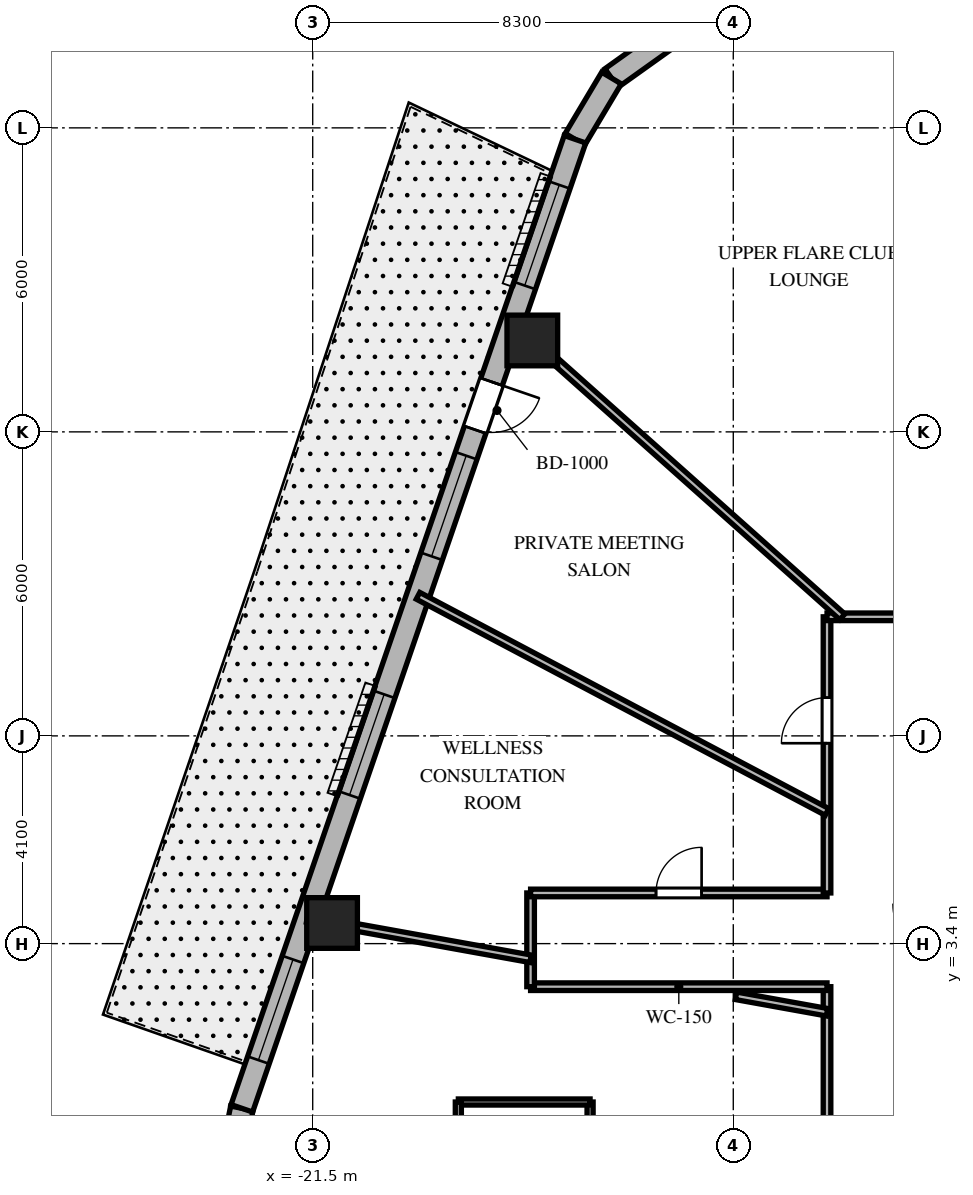
"""IFC4 building model, lengths in metres.
Left out: names, types, materials, properties, quantities, classifications, styles, units other than length and angle.
Written with IfcOpenShell. Run it as: python <this file> out.ifc"""

import sys

from ifc_helpers import new_model, si_unit, direction, frame, frame_2d, origin, origin_2d, place, context, subcontext, project, spatial, rectangle, extrude, element, fill, save


model = new_model("IFC4")
c1 = context("Model", 3, precision=1e-05, world=origin(), true_north=direction((0.0, 1.0)))
c2 = subcontext(c1, "Body", "Model", "MODEL_VIEW")
j1 = project(units=[si_unit("LENGTHUNIT", "METRE"), si_unit("PLANEANGLEUNIT", "RADIAN")], contexts=[c1])
p1 = place(None, origin())
s1 = spatial("IfcSite", under=j1, at=p1, CompositionType="ELEMENT")
p2 = place(p1, origin())
s2 = spatial("IfcBuilding", under=s1, at=p2, CompositionType="ELEMENT")
p3 = place(p2, frame((0.0, 0.0, 206.5)))
s3 = spatial("IfcBuildingStorey", under=s2, at=p3, CompositionType="ELEMENT", Elevation=206.5)
for number, where, z_axis, x_axis in (
    (1, (-17.166, 15.304, 0.0), (0.0, 0.0, 1.0), (1.0, 0.0, 0.0)),
    (2, (-21.118, 3.807, 0.0), (0.0, 0.0, 1.0), (1.0, 0.0, 0.0)),
):
    element("IfcColumn", number, at=place(p3, frame(where, z_axis=z_axis, x_axis=x_axis)), inside=s3, PredefinedType="COLUMN", context=c2, shape_type="SweptSolid", body=[
        extrude(rectangle(XDim=1.0, YDim=1.0, at=origin_2d()), origin(), (0.0, 0.0, 1.0), 3.8),
    ])
p4 = place(p3, frame((-14.478, 21.287, 0.0), z_axis=(0.0, 0.0, 1.0), x_axis=(-0.813888518617, -0.58102106611, 0.0)))
e3 = element("IfcWall", 3, at=p4, inside=s3, PredefinedType="SOLIDWALL", context=c2, shape_type="SweptSolid", body=[
    extrude(rectangle(XDim=1.383, YDim=0.45, at=frame_2d((0.691, 0.0))), origin(), (0.0, 0.0, 1.0), 3.5),
])
p5 = place(p3, frame((-15.604, 20.483, 0.0), z_axis=(0.0, 0.0, 1.0), x_axis=(-0.512222149036, -0.858852996756, 0.0)))
e4 = element("IfcWall", 4, at=p5, inside=s3, PredefinedType="SOLIDWALL", context=c2, shape_type="SweptSolid", body=[
    extrude(rectangle(XDim=1.406, YDim=0.45, at=frame_2d((0.703, 0.0))), origin(), (0.0, 0.0, 1.0), 3.5),
])
p6 = place(p3, frame((-22.898, 0.15, 0.0), z_axis=(0.0, 0.0, 1.0), x_axis=(-0.199055826889, -0.979988151858, 0.0)))
e5 = element("IfcWall", 5, at=p6, inside=s3, PredefinedType="SOLIDWALL", context=c2, shape_type="SweptSolid", body=[
    extrude(rectangle(XDim=0.894, YDim=0.45, at=frame_2d((0.447, 0.0))), origin(), (0.0, 0.0, 1.0), 3.5),
])
p7 = place(p3, frame((-16.324, 19.275, 0.0), z_axis=(0.0, 0.0, 1.0), x_axis=(-0.325083142304, -0.945685439557, 0.0)))
e6 = element("IfcWall", 6, at=p7, inside=s3, PredefinedType="SOLIDWALL", context=c2, shape_type="SweptSolid", body=[
    extrude(rectangle(XDim=20.224, YDim=0.45, at=frame_2d((10.112, 0.0))), origin(), (0.0, 0.0, 1.0), 3.5),
])
p8 = place(p7, frame((5.062, 0.0, 0.0)))
e7 = element("IfcOpeningElement", 7, at=p8, cuts=e6, PredefinedType="OPENING", context=c2, shape_type="SweptSolid", body=[
    extrude(rectangle(XDim=1.0, YDim=2.15, at=frame_2d((0.5, 1.075))), frame((0.0, 0.235, 0.0), z_axis=(0.0, -1.0, 0.0), x_axis=(1.0, 0.0, 0.0)), (0.0, 0.0, 1.0), 0.47),
])
p9 = place(p7, frame((0.953, 0.0, 0.8)))
e8 = element("IfcOpeningElement", 8, at=p9, cuts=e6, PredefinedType="OPENING", context=c2, shape_type="SweptSolid", body=[
    extrude(rectangle(XDim=2.1, YDim=1.85, at=frame_2d((1.05, 0.925))), frame((0.0, 0.235, 0.0), z_axis=(0.0, -1.0, 0.0), x_axis=(1.0, 0.0, 0.0)), (0.0, 0.0, 1.0), 0.47),
])
p10 = place(p7, frame((6.604, 0.0, 0.8)))
e9 = element("IfcOpeningElement", 9, at=p10, cuts=e6, PredefinedType="OPENING", context=c2, shape_type="SweptSolid", body=[
    extrude(rectangle(XDim=2.1, YDim=1.85, at=frame_2d((1.05, 0.925))), frame((0.0, 0.235, 0.0), z_axis=(0.0, -1.0, 0.0), x_axis=(1.0, 0.0, 0.0)), (0.0, 0.0, 1.0), 0.47),
])
p11 = place(p7, frame((11.585, 0.0, 0.8)))
e10 = element("IfcOpeningElement", 10, at=p11, cuts=e6, PredefinedType="OPENING", context=c2, shape_type="SweptSolid", body=[
    extrude(rectangle(XDim=2.1, YDim=1.85, at=frame_2d((1.05, 0.925))), frame((0.0, 0.235, 0.0), z_axis=(0.0, -1.0, 0.0), x_axis=(1.0, 0.0, 0.0)), (0.0, 0.0, 1.0), 0.47),
])
p12 = place(p7, frame((17.118, 0.0, 0.8)))
e11 = element("IfcOpeningElement", 11, at=p12, cuts=e6, PredefinedType="OPENING", context=c2, shape_type="SweptSolid", body=[
    extrude(rectangle(XDim=2.1, YDim=1.85, at=frame_2d((1.05, 0.925))), frame((0.0, 0.235, 0.0), z_axis=(0.0, -1.0, 0.0), x_axis=(1.0, 0.0, 0.0)), (0.0, 0.0, 1.0), 0.47),
])
p13 = place(p3, frame((-11.35, -9.85, 0.0), z_axis=(0.0, 0.0, 1.0), x_axis=(0.0, 1.0, 0.0)))
e12 = element("IfcWall", 12, at=p13, inside=s3, PredefinedType="PARTITIONING", context=c2, shape_type="SweptSolid", body=[
    extrude(rectangle(XDim=12.4, YDim=0.15, at=frame_2d((6.2, 0.0))), origin(), (0.0, 0.0, 1.0), 2.99),
])
p14 = place(p13, frame((8.835, 0.0, 0.0)))
e13 = element("IfcOpeningElement", 13, at=p14, cuts=e12, PredefinedType="OPENING", context=c2, shape_type="SweptSolid", body=[
    extrude(rectangle(XDim=0.95, YDim=2.03, at=frame_2d((0.475, 1.015))), frame((0.0, 0.085, 0.0), z_axis=(0.0, -1.0, 0.0), x_axis=(1.0, 0.0, 0.0)), (0.0, 0.0, 1.0), 0.17),
])
p15 = place(p13, frame((4.191, 0.0, 0.0)))
e14 = element("IfcOpeningElement", 14, at=p15, cuts=e12, PredefinedType="OPENING", context=c2, shape_type="SweptSolid", body=[
    extrude(rectangle(XDim=0.95, YDim=2.03, at=frame_2d((0.475, 1.015))), frame((0.0, 0.085, 0.0), z_axis=(0.0, -1.0, 0.0), x_axis=(1.0, 0.0, 0.0)), (0.0, 0.0, 1.0), 0.17),
])
p16 = place(p13, frame((0.994, 0.0, 0.0)))
e15 = element("IfcOpeningElement", 15, at=p16, cuts=e12, PredefinedType="OPENING", context=c2, shape_type="SweptSolid", body=[
    extrude(rectangle(XDim=0.9, YDim=2.03, at=frame_2d((0.45, 1.015))), frame((0.0, 0.085, 0.0), z_axis=(0.0, -1.0, 0.0), x_axis=(1.0, 0.0, 0.0)), (0.0, 0.0, 1.0), 0.17),
])
p17 = place(p3, frame((-11.35, 2.55, 0.0), z_axis=(0.0, 0.0, 1.0), x_axis=(-1.0, 0.0, 0.0)))
e16 = element("IfcWall", 16, at=p17, inside=s3, PredefinedType="PARTITIONING", context=c2, shape_type="SweptSolid", body=[
    extrude(rectangle(XDim=5.85, YDim=0.15, at=frame_2d((2.925, 0.0))), origin(), (0.0, 0.0, 1.0), 2.94),
])
p18 = place(p3, frame((-17.2, 2.55, 0.0), z_axis=(0.0, 0.0, 1.0), x_axis=(0.0, 1.0, 0.0)))
e17 = element("IfcWall", 17, at=p18, inside=s3, PredefinedType="PARTITIONING", context=c2, shape_type="SweptSolid", body=[
    extrude(rectangle(XDim=1.85, YDim=0.15, at=frame_2d((0.925, 0.0))), origin(), (0.0, 0.0, 1.0), 2.94),
])
p19 = place(p3, frame((-17.2, 4.4, 0.0), z_axis=(0.0, 0.0, 1.0), x_axis=(1.0, 0.0, 0.0)))
e18 = element("IfcWall", 18, at=p19, inside=s3, PredefinedType="PARTITIONING", context=c2, shape_type="SweptSolid", body=[
    extrude(rectangle(XDim=5.85, YDim=0.15, at=frame_2d((2.925, 0.0))), origin(), (0.0, 0.0, 1.0), 2.94),
])
p20 = place(p19, frame((2.475, 0.0, 0.0)))
e19 = element("IfcOpeningElement", 19, at=p20, cuts=e18, PredefinedType="OPENING", context=c2, shape_type="SweptSolid", body=[
    extrude(rectangle(XDim=0.9, YDim=2.03, at=frame_2d((0.45, 1.015))), frame((0.0, 0.085, 0.0), z_axis=(0.0, -1.0, 0.0), x_axis=(1.0, 0.0, 0.0)), (0.0, 0.0, 1.0), 0.17),
])
p21 = place(p3, frame((-11.35, 4.4, 0.0), z_axis=(0.0, 0.0, 1.0), x_axis=(0.0, 1.0, 0.0)))
e20 = element("IfcWall", 20, at=p21, inside=s3, PredefinedType="PARTITIONING", context=c2, shape_type="SweptSolid", body=[
    extrude(rectangle(XDim=5.45, YDim=0.15, at=frame_2d((2.725, 0.0))), origin(), (0.0, 0.0, 1.0), 2.99),
])
p22 = place(p21, frame((2.955, 0.0, 0.0)))
e21 = element("IfcOpeningElement", 21, at=p22, cuts=e20, PredefinedType="OPENING", context=c2, shape_type="SweptSolid", body=[
    extrude(rectangle(XDim=0.9, YDim=2.03, at=frame_2d((0.45, 1.015))), frame((0.0, 0.085, 0.0), z_axis=(0.0, -1.0, 0.0), x_axis=(1.0, 0.0, 0.0)), (0.0, 0.0, 1.0), 0.17),
])
p23 = place(p3, frame((-11.35, 9.85, 0.0), z_axis=(0.0, 0.0, 1.0), x_axis=(1.0, 0.0, 0.0)))
e22 = element("IfcWall", 22, at=p23, inside=s3, PredefinedType="PARTITIONING", context=c2, shape_type="SweptSolid", body=[
    extrude(rectangle(XDim=10.43, YDim=0.15, at=frame_2d((5.215, 0.0))), origin(), (0.0, 0.0, 1.0), 2.99),
])
p24 = place(p23, frame((8.362, 0.0, 0.0)))
e23 = element("IfcOpeningElement", 23, at=p24, cuts=e22, PredefinedType="OPENING", context=c2, shape_type="SweptSolid", body=[
    extrude(rectangle(XDim=0.95, YDim=2.03, at=frame_2d((0.475, 1.015))), frame((0.0, 0.085, 0.0), z_axis=(0.0, -1.0, 0.0), x_axis=(1.0, 0.0, 0.0)), (0.0, 0.0, 1.0), 0.17),
])
p25 = place(p23, frame((3.396, 0.0, 0.0)))
e24 = element("IfcOpeningElement", 24, at=p25, cuts=e22, PredefinedType="OPENING", context=c2, shape_type="SweptSolid", body=[
    extrude(rectangle(XDim=0.95, YDim=2.03, at=frame_2d((0.475, 1.015))), frame((0.0, 0.085, 0.0), z_axis=(0.0, -1.0, 0.0), x_axis=(1.0, 0.0, 0.0)), (0.0, 0.0, 1.0), 0.17),
])
p26 = place(p3, frame((-11.048, 9.85, 0.0), z_axis=(0.0, 0.0, 1.0), x_axis=(-0.746444434655, 0.665447748492, 0.0)))
e25 = element("IfcWall", 25, at=p26, inside=s3, PredefinedType="PARTITIONING", context=c2, shape_type="SweptSolid", body=[
    extrude(rectangle(XDim=8.732, YDim=0.15, at=frame_2d((4.366, 0.0))), origin(), (0.0, 0.0, 1.0), 2.74),
])
p27 = place(p3, frame((-11.35, 5.999, 0.0), z_axis=(0.0, 0.0, 1.0), x_axis=(-0.884112301724, 0.467274478161, 0.0)))
e26 = element("IfcWall", 26, at=p27, inside=s3, PredefinedType="PARTITIONING", context=c2, shape_type="SweptSolid", body=[
    extrude(rectangle(XDim=9.129, YDim=0.15, at=frame_2d((4.564, 0.0))), origin(), (0.0, 0.0, 1.0), 2.74),
])
p28 = place(p3, frame((-11.35, 2.046, 0.0), z_axis=(0.0, 0.0, 1.0), x_axis=(-0.984127783205, 0.177461281195, 0.0)))
e27 = element("IfcWall", 27, at=p28, inside=s3, PredefinedType="PARTITIONING", context=c2, shape_type="SweptSolid", body=[
    extrude(rectangle(XDim=1.826, YDim=0.15, at=frame_2d((0.913, 0.0))), origin(), (0.0, 0.0, 1.0), 3.5),
])
p29 = place(p3, frame((-17.2, 3.101, 0.0), z_axis=(0.0, 0.0, 1.0), x_axis=(-0.98413465883, 0.177423147559, 0.0)))
e28 = element("IfcWall", 28, at=p29, inside=s3, PredefinedType="PARTITIONING", context=c2, shape_type="SweptSolid", body=[
    extrude(rectangle(XDim=4.482, YDim=0.15, at=frame_2d((2.241, 0.0))), origin(), (0.0, 0.0, 1.0), 2.74),
])
p30 = place(p3, frame((-16.026, -2.476, 0.0), z_axis=(0.0, 0.0, 1.0), x_axis=(0.0, 1.0, 0.0)))
e29 = element("IfcWall", 29, at=p30, inside=s3, PredefinedType="PARTITIONING", context=c2, shape_type="SweptSolid", body=[
    extrude(rectangle(XDim=2.75, YDim=0.12, at=frame_2d((1.375, 0.0))), origin(), (0.0, 0.0, 1.0), 3.5),
])
p31 = place(p3, frame((-16.026, 0.274, 0.0), z_axis=(0.0, 0.0, 1.0), x_axis=(-1.0, 0.0, 0.0)))
e30 = element("IfcWall", 30, at=p31, inside=s3, PredefinedType="PARTITIONING", context=c2, shape_type="SweptSolid", body=[
    extrude(rectangle(XDim=2.6, YDim=0.12, at=frame_2d((1.3, 0.0))), origin(), (0.0, 0.0, 1.0), 2.94),
])
p32 = place(p3, frame((-18.626, 0.274, 0.0), z_axis=(0.0, 0.0, 1.0), x_axis=(0.0, -1.0, 0.0)))
e31 = element("IfcWall", 31, at=p32, inside=s3, PredefinedType="PARTITIONING", context=c2, shape_type="SweptSolid", body=[
    extrude(rectangle(XDim=2.75, YDim=0.12, at=frame_2d((1.375, 0.0))), origin(), (0.0, 0.0, 1.0), 3.5),
])
p33 = place(p8, origin())
e32 = element("IfcDoor", 32, at=p33, inside=s3, OperationType="SINGLE_SWING_LEFT", PredefinedType="DOOR", context=c2, shape_type="SweptSolid", body=[
    extrude(rectangle(XDim=1.0, YDim=2.15, at=frame_2d((0.5, 1.075))), frame((0.0, 0.025, 0.0), z_axis=(0.0, -1.0, 0.0), x_axis=(1.0, 0.0, 0.0)), (0.0, 0.0, 1.0), 0.05),
])
fill(e7, e32)
p34 = place(p9, origin())
e33 = element("IfcWindow", 33, at=p34, inside=s3, PartitioningType="SINGLE_PANEL", PredefinedType="WINDOW", context=c2, shape_type="SweptSolid", body=[
    extrude(rectangle(XDim=2.1, YDim=1.85, at=frame_2d((1.05, 0.925))), frame((0.0, 0.03, 0.0), z_axis=(0.0, -1.0, 0.0), x_axis=(1.0, 0.0, 0.0)), (0.0, 0.0, 1.0), 0.06),
])
fill(e8, e33)
p35 = place(p10, origin())
e34 = element("IfcWindow", 34, at=p35, inside=s3, PartitioningType="SINGLE_PANEL", PredefinedType="WINDOW", context=c2, shape_type="SweptSolid", body=[
    extrude(rectangle(XDim=2.1, YDim=1.85, at=frame_2d((1.05, 0.925))), frame((0.0, 0.03, 0.0), z_axis=(0.0, -1.0, 0.0), x_axis=(1.0, 0.0, 0.0)), (0.0, 0.0, 1.0), 0.06),
])
fill(e9, e34)
p36 = place(p11, origin())
e35 = element("IfcWindow", 35, at=p36, inside=s3, PartitioningType="SINGLE_PANEL", PredefinedType="WINDOW", context=c2, shape_type="SweptSolid", body=[
    extrude(rectangle(XDim=2.1, YDim=1.85, at=frame_2d((1.05, 0.925))), frame((0.0, 0.03, 0.0), z_axis=(0.0, -1.0, 0.0), x_axis=(1.0, 0.0, 0.0)), (0.0, 0.0, 1.0), 0.06),
])
fill(e10, e35)
p37 = place(p12, origin())
e36 = element("IfcWindow", 36, at=p37, inside=s3, PartitioningType="SINGLE_PANEL", PredefinedType="WINDOW", context=c2, shape_type="SweptSolid", body=[
    extrude(rectangle(XDim=2.1, YDim=1.85, at=frame_2d((1.05, 0.925))), frame((0.0, 0.03, 0.0), z_axis=(0.0, -1.0, 0.0), x_axis=(1.0, 0.0, 0.0)), (0.0, 0.0, 1.0), 0.06),
])
fill(e11, e36)
p38 = place(p22, origin())
e37 = element("IfcDoor", 37, at=p38, inside=s3, OperationType="SINGLE_SWING_LEFT", PredefinedType="DOOR", context=c2, shape_type="SweptSolid", body=[
    extrude(rectangle(XDim=0.9, YDim=2.03, at=frame_2d((0.45, 1.015))), frame((0.0, 0.025, 0.0), z_axis=(0.0, -1.0, 0.0), x_axis=(1.0, 0.0, 0.0)), (0.0, 0.0, 1.0), 0.05),
])
fill(e21, e37)
p39 = place(p20, origin())
e38 = element("IfcDoor", 38, at=p39, inside=s3, OperationType="SINGLE_SWING_RIGHT", PredefinedType="DOOR", context=c2, shape_type="SweptSolid", body=[
    extrude(rectangle(XDim=0.9, YDim=2.03, at=frame_2d((0.45, 1.015))), frame((0.0, 0.025, 0.0), z_axis=(0.0, -1.0, 0.0), x_axis=(1.0, 0.0, 0.0)), (0.0, 0.0, 1.0), 0.05),
])
fill(e19, e38)
save(model, sys.argv[1])
